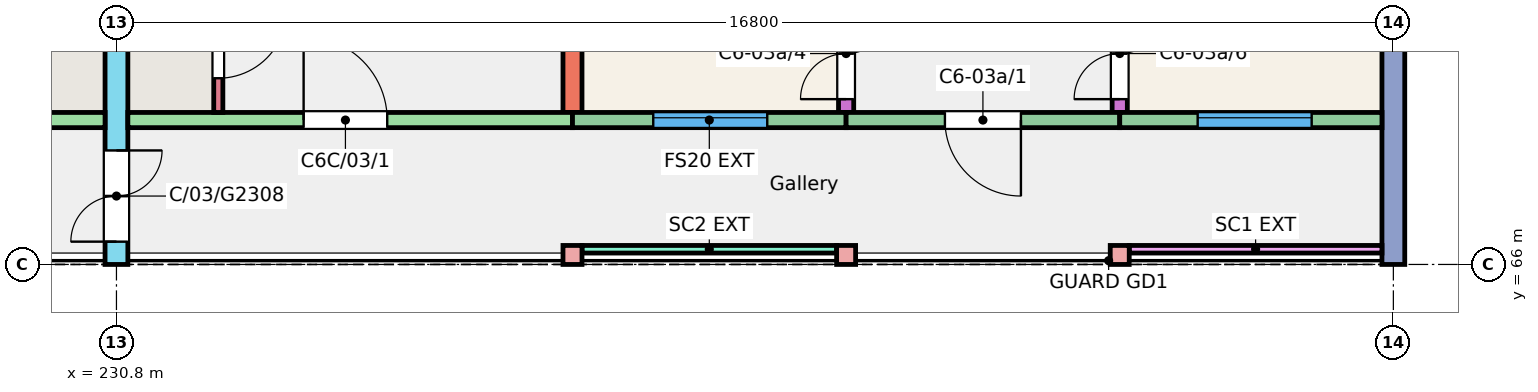
"""IFC4 building model, lengths in metres.
Left out: names, types, materials, properties, quantities, classifications, styles, units other than length and angle.
Written with IfcOpenShell. Run it as: python <this file> out.ifc"""

import sys

from ifc_helpers import new_model, si_unit, direction, frame, frame_2d, origin, origin_2d, place, context, subcontext, project, spatial, rectangle, extrude, element, fill, save


model = new_model("IFC4")
c1 = context("Model", 3, precision=1e-05, world=origin(), true_north=direction((0.0, 1.0)))
c2 = subcontext(c1, "Body", "Model", "MODEL_VIEW")
j1 = project(units=[si_unit("LENGTHUNIT", "METRE"), si_unit("PLANEANGLEUNIT", "RADIAN")], contexts=[c1])
p1 = place(None, origin())
s1 = spatial("IfcSite", under=j1, at=p1, CompositionType="ELEMENT")
p2 = place(p1, origin())
s2 = spatial("IfcBuilding", under=s1, at=p2, CompositionType="ELEMENT")
p3 = place(p2, frame((0.0, 0.0, 9.0)))
s3 = spatial("IfcBuildingStorey", under=s2, at=p3, CompositionType="ELEMENT", Elevation=9.0)
p4 = place(p3, frame((230.8, 66.0, 0.0), z_axis=(0.0, 0.0, 1.0), x_axis=(0.0, 1.0, 0.0)))
e1 = element("IfcWall", 1, at=p4, inside=s3, PredefinedType="SHEAR", context=c2, shape_type="SweptSolid", body=[
    extrude(rectangle(XDim=11.0, YDim=0.3, at=frame_2d((5.5, 0.0))), origin(), (0.0, 0.0, 1.0), 3.0),
])
p5 = place(p4, frame((0.3, 0.0, 0.0)))
e2 = element("IfcOpeningElement", 2, at=p5, cuts=e1, PredefinedType="OPENING", context=c2, shape_type="SweptSolid", body=[
    extrude(rectangle(XDim=1.2, YDim=2.1, at=frame_2d((0.6, 1.05))), frame((0.0, 0.16, 0.0), z_axis=(0.0, -1.0, 0.0), x_axis=(1.0, 0.0, 0.0)), (0.0, 0.0, 1.0), 0.32),
])
p6 = place(p3, frame((236.8, 68.0, 0.0), z_axis=(0.0, 0.0, 1.0), x_axis=(0.0, 1.0, 0.0)))
e3 = element("IfcWall", 3, at=p6, inside=s3, PredefinedType="SHEAR", context=c2, shape_type="SweptSolid", body=[
    extrude(rectangle(XDim=9.0, YDim=0.25, at=frame_2d((4.5, 0.0))), origin(), (0.0, 0.0, 1.0), 3.0),
])
p7 = place(p3, frame((240.4, 68.0, 0.0), z_axis=(0.0, 0.0, 1.0), x_axis=(0.0, 1.0, 0.0)))
e4 = element("IfcWall", 4, at=p7, inside=s3, PredefinedType="SHEAR", context=c2, shape_type="SweptSolid", body=[
    extrude(rectangle(XDim=9.0, YDim=0.2, at=frame_2d((4.5, 0.0))), origin(), (0.0, 0.0, 1.0), 3.0),
])
p8 = place(p7, frame((0.175, 0.0, 0.0)))
e5 = element("IfcOpeningElement", 5, at=p8, cuts=e4, PredefinedType="OPENING", context=c2, shape_type="SweptSolid", body=[
    extrude(rectangle(XDim=1.2, YDim=2.1, at=frame_2d((0.6, 1.05))), frame((0.0, 0.11, 0.0), z_axis=(0.0, -1.0, 0.0), x_axis=(1.0, 0.0, 0.0)), (0.0, 0.0, 1.0), 0.22),
])
p9 = place(p7, frame((6.4, 0.0, 0.0)))
e6 = element("IfcOpeningElement", 6, at=p9, cuts=e4, PredefinedType="OPENING", context=c2, shape_type="SweptSolid", body=[
    extrude(rectangle(XDim=1.2, YDim=2.1, at=frame_2d((0.6, 1.05))), frame((0.0, 0.11, 0.0), z_axis=(0.0, -1.0, 0.0), x_axis=(1.0, 0.0, 0.0)), (0.0, 0.0, 1.0), 0.22),
])
p10 = place(p3, frame((244.0, 68.0, 0.0), z_axis=(0.0, 0.0, 1.0), x_axis=(0.0, 1.0, 0.0)))
e7 = element("IfcWall", 7, at=p10, inside=s3, PredefinedType="SHEAR", context=c2, shape_type="SweptSolid", body=[
    extrude(rectangle(XDim=9.0, YDim=0.2, at=frame_2d((4.5, 0.0))), origin(), (0.0, 0.0, 1.0), 3.0),
])
p11 = place(p10, frame((0.175, 0.0, 0.0)))
e8 = element("IfcOpeningElement", 8, at=p11, cuts=e7, PredefinedType="OPENING", context=c2, shape_type="SweptSolid", body=[
    extrude(rectangle(XDim=1.2, YDim=2.1, at=frame_2d((0.6, 1.05))), frame((0.0, 0.11, 0.0), z_axis=(0.0, -1.0, 0.0), x_axis=(1.0, 0.0, 0.0)), (0.0, 0.0, 1.0), 0.22),
])
p12 = place(p10, frame((6.4, 0.0, 0.0)))
e9 = element("IfcOpeningElement", 9, at=p12, cuts=e7, PredefinedType="OPENING", context=c2, shape_type="SweptSolid", body=[
    extrude(rectangle(XDim=1.2, YDim=2.1, at=frame_2d((0.6, 1.05))), frame((0.0, 0.11, 0.0), z_axis=(0.0, -1.0, 0.0), x_axis=(1.0, 0.0, 0.0)), (0.0, 0.0, 1.0), 0.22),
])
p13 = place(p3, frame((247.6, 66.0, 0.0), z_axis=(0.0, 0.0, 1.0), x_axis=(0.0, 1.0, 0.0)))
e10 = element("IfcWall", 10, at=p13, inside=s3, PredefinedType="SHEAR", context=c2, shape_type="SweptSolid", body=[
    extrude(rectangle(XDim=11.0, YDim=0.3, at=frame_2d((5.5, 0.0))), origin(), (0.0, 0.0, 1.0), 3.0),
])
p14 = place(p13, frame((3.45, 0.0, 0.9)))
e11 = element("IfcOpeningElement", 11, at=p14, cuts=e10, PredefinedType="OPENING", context=c2, shape_type="SweptSolid", body=[
    extrude(rectangle(XDim=1.5, YDim=1.5, at=frame_2d((0.75, 0.75))), frame((0.0, 0.16, 0.0), z_axis=(0.0, -1.0, 0.0), x_axis=(1.0, 0.0, 0.0)), (0.0, 0.0, 1.0), 0.32),
])
p15 = place(p13, frame((8.155, 0.0, 0.9)))
e12 = element("IfcOpeningElement", 12, at=p15, cuts=e10, PredefinedType="OPENING", context=c2, shape_type="SweptSolid", body=[
    extrude(rectangle(XDim=1.2, YDim=1.5, at=frame_2d((0.6, 0.75))), frame((0.0, 0.16, 0.0), z_axis=(0.0, -1.0, 0.0), x_axis=(1.0, 0.0, 0.0)), (0.0, 0.0, 1.0), 0.32),
])
p16 = place(p3, frame((224.8, 67.9, 0.0), z_axis=(0.0, 0.0, 1.0), x_axis=(1.0, 0.0, 0.0)))
e13 = element("IfcWall", 13, at=p16, inside=s3, PredefinedType="SHEAR", context=c2, shape_type="SweptSolid", body=[
    extrude(rectangle(XDim=5.85, YDim=0.2, at=frame_2d((2.925, 0.0))), origin(), (0.0, 0.0, 1.0), 3.0),
])
p17 = place(p16, frame((2.438, 0.0, 0.0)))
e14 = element("IfcOpeningElement", 14, at=p17, cuts=e13, PredefinedType="OPENING", context=c2, shape_type="SweptSolid", body=[
    extrude(rectangle(XDim=1.1, YDim=2.1, at=frame_2d((0.55, 1.05))), frame((0.0, 0.11, 0.0), z_axis=(0.0, -1.0, 0.0), x_axis=(1.0, 0.0, 0.0)), (0.0, 0.0, 1.0), 0.22),
])
p18 = place(p3, frame((230.95, 67.9, 0.0), z_axis=(0.0, 0.0, 1.0), x_axis=(1.0, 0.0, 0.0)))
e15 = element("IfcWall", 15, at=p18, inside=s3, PredefinedType="SHEAR", context=c2, shape_type="SweptSolid", body=[
    extrude(rectangle(XDim=5.85, YDim=0.2, at=frame_2d((2.925, 0.0))), origin(), (0.0, 0.0, 1.0), 3.0),
])
p19 = place(p18, frame((2.312, 0.0, 0.0)))
e16 = element("IfcOpeningElement", 16, at=p19, cuts=e15, PredefinedType="OPENING", context=c2, shape_type="SweptSolid", body=[
    extrude(rectangle(XDim=1.1, YDim=2.1, at=frame_2d((0.55, 1.05))), frame((0.0, 0.11, 0.0), z_axis=(0.0, -1.0, 0.0), x_axis=(1.0, 0.0, 0.0)), (0.0, 0.0, 1.0), 0.22),
])
p20 = place(p3, frame((232.14, 68.0, 0.0), z_axis=(0.0, 0.0, 1.0), x_axis=(0.0, 1.0, 0.0)))
e17 = element("IfcWall", 17, at=p20, inside=s3, PredefinedType="SHEAR", context=c2, shape_type="SweptSolid", body=[
    extrude(rectangle(XDim=1.72, YDim=0.12, at=frame_2d((0.86, 0.0))), origin(), (0.0, 0.0, 1.0), 3.0),
])
p21 = place(p20, frame((0.45, 0.0, 0.0)))
e18 = element("IfcOpeningElement", 18, at=p21, cuts=e17, PredefinedType="OPENING", context=c2, shape_type="SweptSolid", body=[
    extrude(rectangle(XDim=0.9, YDim=2.1, at=frame_2d((0.45, 1.05))), frame((0.0, 0.07, 0.0), z_axis=(0.0, -1.0, 0.0), x_axis=(1.0, 0.0, 0.0)), (0.0, 0.0, 1.0), 0.14),
])
p22 = place(p3, frame((236.8, 67.9, 0.0), z_axis=(0.0, 0.0, 1.0), x_axis=(1.0, 0.0, 0.0)))
e19 = element("IfcWall", 19, at=p22, inside=s3, PredefinedType="SOLIDWALL", context=c2, shape_type="SweptSolid", body=[
    extrude(rectangle(XDim=3.6, YDim=0.2, at=frame_2d((1.8, 0.0))), origin(), (0.0, 0.0, 1.0), 3.0),
])
p23 = place(p22, frame((1.062, 0.0, 0.9)))
e20 = element("IfcOpeningElement", 20, at=p23, cuts=e19, PredefinedType="OPENING", context=c2, shape_type="SweptSolid", body=[
    extrude(rectangle(XDim=1.5, YDim=1.5, at=frame_2d((0.75, 0.75))), frame((0.0, 0.11, 0.0), z_axis=(0.0, -1.0, 0.0), x_axis=(1.0, 0.0, 0.0)), (0.0, 0.0, 1.0), 0.22),
])
p24 = place(p3, frame((240.4, 67.9, 0.0), z_axis=(0.0, 0.0, 1.0), x_axis=(1.0, 0.0, 0.0)))
e21 = element("IfcWall", 21, at=p24, inside=s3, PredefinedType="SOLIDWALL", context=c2, shape_type="SweptSolid", body=[
    extrude(rectangle(XDim=3.6, YDim=0.2, at=frame_2d((1.8, 0.0))), origin(), (0.0, 0.0, 1.0), 3.0),
])
p25 = place(p24, frame((1.3, 0.0, 0.0)))
e22 = element("IfcOpeningElement", 22, at=p25, cuts=e21, PredefinedType="OPENING", context=c2, shape_type="SweptSolid", body=[
    extrude(rectangle(XDim=1.0, YDim=2.1, at=frame_2d((0.5, 1.05))), frame((0.0, 0.11, 0.0), z_axis=(0.0, -1.0, 0.0), x_axis=(1.0, 0.0, 0.0)), (0.0, 0.0, 1.0), 0.22),
])
p26 = place(p3, frame((244.0, 67.9, 0.0), z_axis=(0.0, 0.0, 1.0), x_axis=(1.0, 0.0, 0.0)))
e23 = element("IfcWall", 23, at=p26, inside=s3, PredefinedType="SOLIDWALL", context=c2, shape_type="SweptSolid", body=[
    extrude(rectangle(XDim=3.45, YDim=0.2, at=frame_2d((1.725, 0.0))), origin(), (0.0, 0.0, 1.0), 3.0),
])
p27 = place(p26, frame((1.025, 0.0, 0.9)))
e24 = element("IfcOpeningElement", 24, at=p27, cuts=e23, PredefinedType="OPENING", context=c2, shape_type="SweptSolid", body=[
    extrude(rectangle(XDim=1.5, YDim=1.5, at=frame_2d((0.75, 0.75))), frame((0.0, 0.11, 0.0), z_axis=(0.0, -1.0, 0.0), x_axis=(1.0, 0.0, 0.0)), (0.0, 0.0, 1.0), 0.22),
])
for number, where, z_axis, x_axis in (
    (25, (236.8, 66.125, 0.0), (0.0, 0.0, 1.0), (1.0, 0.0, 0.0)),
    (26, (240.4, 66.125, 0.0), (0.0, 0.0, 1.0), (1.0, 0.0, 0.0)),
    (27, (244.0, 66.125, 0.0), (0.0, 0.0, 1.0), (1.0, 0.0, 0.0)),
):
    element("IfcColumn", number, at=place(p3, frame(where, z_axis=z_axis, x_axis=x_axis)), inside=s3, PredefinedType="COLUMN", context=c2, shape_type="SweptSolid", body=[
        extrude(rectangle(XDim=0.25, YDim=0.25, at=origin_2d()), origin(), (0.0, 0.0, 1.0), 3.0),
    ])
p28 = place(p3, frame((236.925, 66.2, 0.0), z_axis=(0.0, 0.0, 1.0), x_axis=(1.0, 0.0, 0.0)))
e28 = element("IfcWall", 28, at=p28, inside=s3, PredefinedType="SOLIDWALL", context=c2, shape_type="SweptSolid", body=[
    extrude(rectangle(XDim=3.35, YDim=0.1, at=frame_2d((1.675, 0.0))), origin(), (0.0, 0.0, 1.0), 2.45),
])
p29 = place(p3, frame((244.125, 66.2, 0.0), z_axis=(0.0, 0.0, 1.0), x_axis=(1.0, 0.0, 0.0)))
e29 = element("IfcWall", 29, at=p29, inside=s3, PredefinedType="SOLIDWALL", context=c2, shape_type="SweptSolid", body=[
    extrude(rectangle(XDim=3.325, YDim=0.1, at=frame_2d((1.663, 0.0))), origin(), (0.0, 0.0, 1.0), 2.45),
])
p30 = place(p23, origin())
e30 = element("IfcWindow", 30, at=p30, inside=s3, PartitioningType="SINGLE_PANEL", PredefinedType="WINDOW", context=c2, shape_type="SweptSolid", body=[
    extrude(rectangle(XDim=1.5, YDim=1.5, at=frame_2d((0.75, 0.75))), frame((0.0, 0.06, 0.0), z_axis=(0.0, -1.0, 0.0), x_axis=(1.0, 0.0, 0.0)), (0.0, 0.0, 1.0), 0.06),
])
fill(e20, e30)
p31 = place(p27, origin())
e31 = element("IfcWindow", 31, at=p31, inside=s3, PartitioningType="SINGLE_PANEL", PredefinedType="WINDOW", context=c2, shape_type="SweptSolid", body=[
    extrude(rectangle(XDim=1.5, YDim=1.5, at=frame_2d((0.75, 0.75))), frame((0.0, 0.06, 0.0), z_axis=(0.0, -1.0, 0.0), x_axis=(1.0, 0.0, 0.0)), (0.0, 0.0, 1.0), 0.06),
])
fill(e24, e31)
p32 = place(p25, origin())
e32 = element("IfcDoor", 32, at=p32, inside=s3, OperationType="SINGLE_SWING_RIGHT", PredefinedType="DOOR", context=c2, shape_type="SweptSolid", body=[
    extrude(rectangle(XDim=1.0, YDim=2.1, at=frame_2d((0.5, 1.05))), frame((0.0, 0.025, 0.0), z_axis=(0.0, -1.0, 0.0), x_axis=(1.0, 0.0, 0.0)), (0.0, 0.0, 1.0), 0.05),
])
fill(e22, e32)
p33 = place(p8, origin())
e33 = element("IfcDoor", 33, at=p33, inside=s3, OperationType="DOUBLE_DOOR_SINGLE_SWING", PredefinedType="DOOR", context=c2, shape_type="SweptSolid", body=[
    extrude(rectangle(XDim=1.2, YDim=2.1, at=frame_2d((0.6, 1.05))), frame((0.0, 0.025, 0.0), z_axis=(0.0, -1.0, 0.0), x_axis=(1.0, 0.0, 0.0)), (0.0, 0.0, 1.0), 0.05),
])
fill(e5, e33)
p34 = place(p11, origin())
e34 = element("IfcDoor", 34, at=p34, inside=s3, OperationType="DOUBLE_DOOR_SINGLE_SWING", PredefinedType="DOOR", context=c2, shape_type="SweptSolid", body=[
    extrude(rectangle(XDim=1.2, YDim=2.1, at=frame_2d((0.6, 1.05))), frame((0.0, 0.025, 0.0), z_axis=(0.0, -1.0, 0.0), x_axis=(1.0, 0.0, 0.0)), (0.0, 0.0, 1.0), 0.05),
])
fill(e8, e34)
p35 = place(p19, origin())
e35 = element("IfcDoor", 35, at=p35, inside=s3, OperationType="SINGLE_SWING_LEFT", PredefinedType="DOOR", context=c2, shape_type="SweptSolid", body=[
    extrude(rectangle(XDim=1.1, YDim=2.1, at=frame_2d((0.55, 1.05))), frame((0.0, 0.025, 0.0), z_axis=(0.0, -1.0, 0.0), x_axis=(1.0, 0.0, 0.0)), (0.0, 0.0, 1.0), 0.05),
])
fill(e16, e35)
p36 = place(p21, origin())
e36 = element("IfcDoor", 36, at=p36, inside=s3, OperationType="SINGLE_SWING_RIGHT", PredefinedType="DOOR", context=c2, shape_type="SweptSolid", body=[
    extrude(rectangle(XDim=0.9, YDim=2.1, at=frame_2d((0.45, 1.05))), frame((0.0, 0.025, 0.0), z_axis=(0.0, -1.0, 0.0), x_axis=(1.0, 0.0, 0.0)), (0.0, 0.0, 1.0), 0.05),
])
fill(e18, e36)
p37 = place(p5, origin())
e37 = element("IfcDoor", 37, at=p37, inside=s3, OperationType="DOUBLE_DOOR_SINGLE_SWING", PredefinedType="DOOR", context=c2, shape_type="SweptSolid", body=[
    extrude(rectangle(XDim=1.2, YDim=2.1, at=frame_2d((0.6, 1.05))), frame((0.0, 0.025, 0.0), z_axis=(0.0, -1.0, 0.0), x_axis=(1.0, 0.0, 0.0)), (0.0, 0.0, 1.0), 0.05),
])
fill(e2, e37)
save(model, sys.argv[1])
